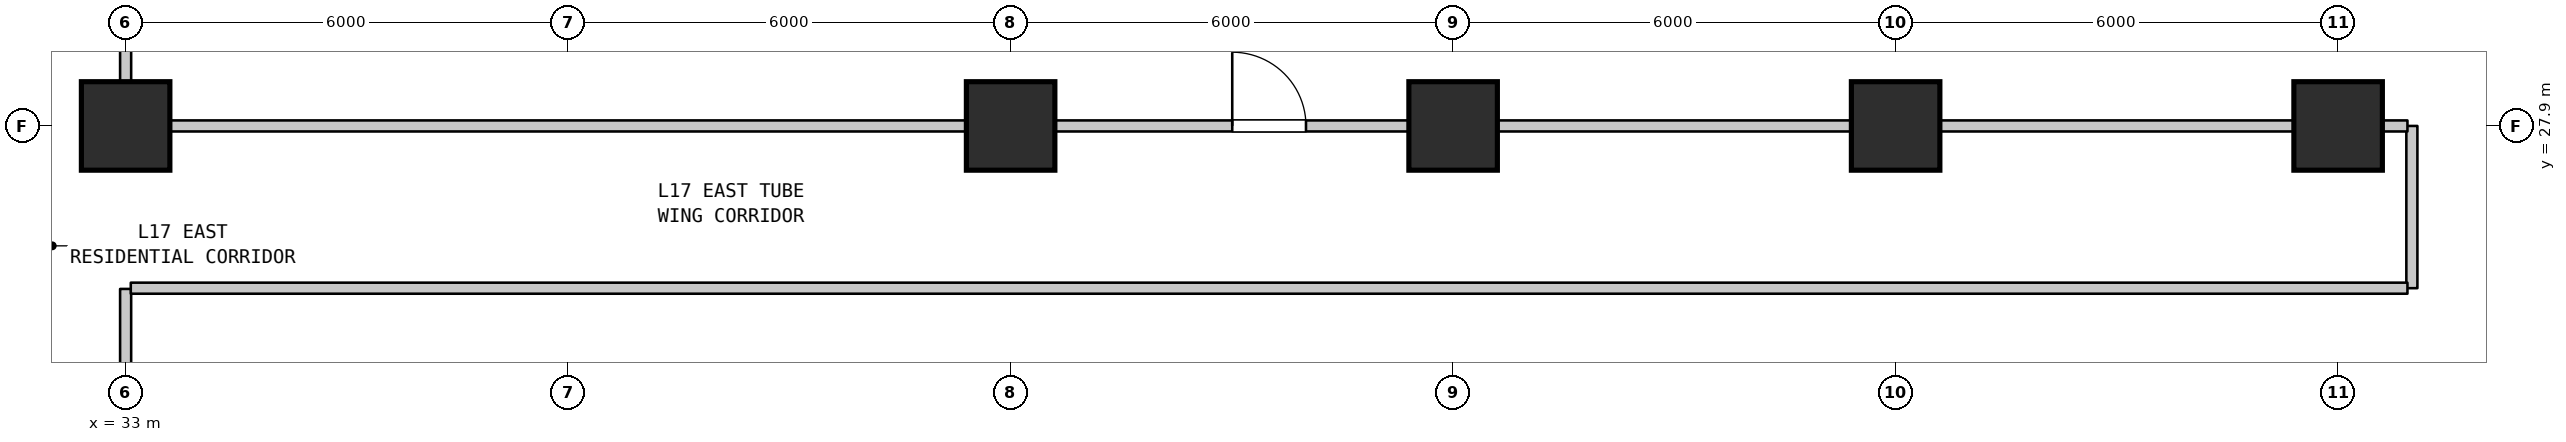
"""IFC4 building model, lengths in metres.
Left out: names, types, materials, properties, quantities, classifications, styles, units other than length and angle.
Written with IfcOpenShell. Run it as: python <this file> out.ifc"""

import sys

from ifc_helpers import new_model, si_unit, direction, frame, frame_2d, origin, origin_2d, place, context, subcontext, project, spatial, rectangle, extrude, element, fill, save


model = new_model("IFC4")
c1 = context("Model", 3, precision=1e-05, world=origin(), true_north=direction((0.0, 1.0)))
c2 = subcontext(c1, "Body", "Model", "MODEL_VIEW")
j1 = project(units=[si_unit("LENGTHUNIT", "METRE"), si_unit("PLANEANGLEUNIT", "RADIAN")], contexts=[c1])
p1 = place(None, origin())
s1 = spatial("IfcSite", under=j1, at=p1, CompositionType="ELEMENT")
p2 = place(p1, origin())
s2 = spatial("IfcBuilding", under=s1, at=p2, CompositionType="ELEMENT")
p3 = place(p2, frame((0.0, 0.0, 73.8)))
s3 = spatial("IfcBuildingStorey", under=s2, at=p3, CompositionType="ELEMENT", Elevation=73.8)
for number, where, z_axis, x_axis in (
    (1, (33.0, 27.9, 0.0), (0.0, 0.0, 1.0), (1.0, 0.0, 0.0)),
    (2, (45.0, 27.9, 0.0), (0.0, 0.0, 1.0), (1.0, 0.0, 0.0)),
    (3, (51.0, 27.9, 0.0), (0.0, 0.0, 1.0), (1.0, 0.0, 0.0)),
    (4, (57.0, 27.9, 0.0), (0.0, 0.0, 1.0), (1.0, 0.0, 0.0)),
    (5, (63.0, 27.9, 0.0), (0.0, 0.0, 1.0), (1.0, 0.0, 0.0)),
):
    element("IfcColumn", number, at=place(p3, frame(where, z_axis=z_axis, x_axis=x_axis)), inside=s3, PredefinedType="COLUMN", context=c2, shape_type="SweptSolid", body=[
        extrude(rectangle(XDim=1.2, YDim=1.2, at=origin_2d()), origin(), (0.0, 0.0, 1.0), 3.7),
    ])
p4 = place(p3, frame((33.0, 19.51, 0.0), z_axis=(0.0, 0.0, 1.0), x_axis=(0.0, 1.0, 0.0)))
e6 = element("IfcWall", 6, at=p4, inside=s3, PredefinedType="STANDARD", context=c2, shape_type="SweptSolid", body=[
    extrude(rectangle(XDim=6.18, YDim=0.15, at=frame_2d((3.09, 0.0))), origin(), (0.0, 0.0, 1.0), 2.885),
])
p5 = place(p3, frame((33.0, 27.91, 0.0), z_axis=(0.0, 0.0, 1.0), x_axis=(0.0, 1.0, 0.0)))
e7 = element("IfcWall", 7, at=p5, inside=s3, PredefinedType="STANDARD", context=c2, shape_type="SweptSolid", body=[
    extrude(rectangle(XDim=9.98, YDim=0.15, at=frame_2d((4.99, 0.0))), origin(), (0.0, 0.0, 1.0), 2.885),
])
p6 = place(p3, frame((64.0, 25.7, 0.0), z_axis=(0.0, 0.0, 1.0), x_axis=(0.0, 1.0, 0.0)))
e8 = element("IfcWall", 8, at=p6, inside=s3, PredefinedType="STANDARD", context=c2, shape_type="SweptSolid", body=[
    extrude(rectangle(XDim=2.2, YDim=0.15, at=frame_2d((1.1, 0.0))), origin(), (0.0, 0.0, 1.0), 3.385),
])
p7 = place(p3, frame((33.07, 25.7, 0.0), z_axis=(0.0, 0.0, 1.0), x_axis=(1.0, 0.0, 0.0)))
e9 = element("IfcWall", 9, at=p7, inside=s3, PredefinedType="STANDARD", context=c2, shape_type="SweptSolid", body=[
    extrude(rectangle(XDim=30.87, YDim=0.15, at=frame_2d((15.435, 0.0))), origin(), (0.0, 0.0, 1.0), 3.385),
])
p8 = place(p3, frame((33.07, 27.9, 0.0), z_axis=(0.0, 0.0, 1.0), x_axis=(1.0, 0.0, 0.0)))
e10 = element("IfcWall", 10, at=p8, inside=s3, PredefinedType="STANDARD", context=c2, shape_type="SweptSolid", body=[
    extrude(rectangle(XDim=30.87, YDim=0.15, at=frame_2d((15.435, 0.0))), origin(), (0.0, 0.0, 1.0), 2.885),
])
p9 = place(p8, frame((14.935, 0.0, 0.0)))
e11 = element("IfcOpeningElement", 11, at=p9, cuts=e10, PredefinedType="OPENING", context=c2, shape_type="SweptSolid", body=[
    extrude(rectangle(XDim=1.0, YDim=2.15, at=frame_2d((0.5, 1.075))), frame((0.0, 0.085, 0.0), z_axis=(0.0, -1.0, 0.0), x_axis=(1.0, 0.0, 0.0)), (0.0, 0.0, 1.0), 0.17),
])
p10 = place(p9, origin())
e12 = element("IfcDoor", 12, at=p10, inside=s3, OperationType="SINGLE_SWING_LEFT", PredefinedType="DOOR", context=c2, shape_type="SweptSolid", body=[
    extrude(rectangle(XDim=1.0, YDim=2.15, at=frame_2d((0.5, 1.075))), frame((0.0, 0.025, 0.0), z_axis=(0.0, -1.0, 0.0), x_axis=(1.0, 0.0, 0.0)), (0.0, 0.0, 1.0), 0.05),
])
fill(e11, e12)
save(model, sys.argv[1])
